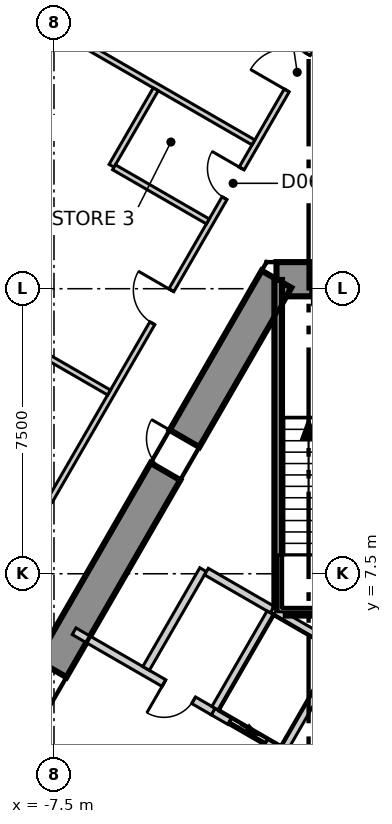
"""IFC4 building model, lengths in metres.
Left out: names, types, materials, properties, quantities, classifications, styles, units other than length and angle.
Written with IfcOpenShell. Run it as: python <this file> out.ifc"""

import sys

from ifc_helpers import new_model, si_unit, direction, frame, frame_2d, origin, place, context, subcontext, project, spatial, polyline, rectangle, outline, extrude, element, fill, save


model = new_model("IFC4")
c1 = context("Model", 3, precision=1e-05, world=origin(), true_north=direction((0.0, 1.0)))
c2 = subcontext(c1, "Body", "Model", "MODEL_VIEW")
j1 = project(units=[si_unit("LENGTHUNIT", "METRE"), si_unit("PLANEANGLEUNIT", "RADIAN")], contexts=[c1])
p1 = place(None, origin())
s1 = spatial("IfcSite", under=j1, at=p1, CompositionType="ELEMENT")
p2 = place(p1, origin())
s2 = spatial("IfcBuilding", under=s1, at=p2, CompositionType="ELEMENT")
p3 = place(p2, frame((0.0, 0.0, 35.3)))
s3 = spatial("IfcBuildingStorey", under=s2, at=p3, CompositionType="ELEMENT", Elevation=35.3)
p4 = place(p3, frame((1.645, 15.25, -0.3), z_axis=(0.0, 0.0, 1.0), x_axis=(-1.0, 0.0, 0.0)))
e1 = element("IfcWall", 1, at=p4, inside=s3, PredefinedType="SHEAR", context=c2, shape_type="SweptSolid", body=[
    extrude(outline(polyline([(-0.26, -0.45), (1.645, -0.45), (3.55, -0.45), (3.031, 0.45), (1.645, 0.45), (0.259, 0.45), (-0.26, -0.45)])), origin(), (0.0, 0.0, 1.0), 4.0),
])
p5 = place(p4, frame((0.945, 0.0, 0.3)))
e2 = element("IfcOpeningElement", 2, at=p5, cuts=e1, PredefinedType="OPENING", context=c2, shape_type="SweptSolid", body=[
    extrude(rectangle(XDim=1.4, YDim=2.1, at=frame_2d((0.7, 1.05))), frame((0.0, 0.46, 0.0), z_axis=(0.0, -1.0, 0.0), x_axis=(1.0, 0.0, 0.0)), (0.0, 0.0, 1.0), 0.92),
])
p6 = place(p3, frame((-1.645, 15.25, -0.3), z_axis=(0.0, 0.0, 1.0), x_axis=(-0.500026485275, -0.866010111964, 0.0)))
e3 = element("IfcWall", 3, at=p6, inside=s3, PredefinedType="SHEAR", context=c2, shape_type="SweptSolid", body=[
    extrude(outline(polyline([(-0.26, -0.45), (1.685, -0.45), (3.63, -0.45), (5.576, -0.45), (7.521, -0.45), (9.466, -0.449), (11.411, -0.449), (13.357, -0.449), (15.302, -0.449), (17.247, -0.449), (19.192, -0.449), (21.138, -0.449), (23.083, -0.449), (25.028, -0.449), (24.509, 0.45), (22.644, 0.45), (20.778, 0.45), (18.913, 0.45), (17.048, 0.45), (15.182, 0.449), (13.317, 0.449), (11.452, 0.449), (9.587, 0.449), (7.721, 0.449), (5.856, 0.449), (3.991, 0.449), (2.125, 0.449), (0.26, 0.449), (-0.26, -0.45)])), origin(), (0.0, 0.0, 1.0), 4.0),
])
p7 = place(p6, frame((11.834, 0.0, 0.3)))
e4 = element("IfcOpeningElement", 4, at=p7, cuts=e3, PredefinedType="OPENING", context=c2, shape_type="SweptSolid", body=[
    extrude(rectangle(XDim=1.1, YDim=2.1, at=frame_2d((0.55, 1.05))), frame((0.0, 0.46, 0.0), z_axis=(0.0, -1.0, 0.0), x_axis=(1.0, 0.0, 0.0)), (0.0, 0.0, 1.0), 0.92),
])
p8 = place(p6, frame((4.842, 0.0, 0.3)))
e5 = element("IfcOpeningElement", 5, at=p8, cuts=e3, PredefinedType="OPENING", context=c2, shape_type="SweptSolid", body=[
    extrude(rectangle(XDim=1.0, YDim=2.1, at=frame_2d((0.5, 1.05))), frame((0.0, 0.46, 0.0), z_axis=(0.0, -1.0, 0.0), x_axis=(1.0, 0.0, 0.0)), (0.0, 0.0, 1.0), 0.92),
])
p9 = place(p3, frame((-3.462, 38.603, 0.0), z_axis=(0.0, 0.0, 1.0), x_axis=(-0.500012207976, -0.866018355391, 0.0)))
e6 = element("IfcWall", 6, at=p9, inside=s3, PredefinedType="ELEMENTEDWALL", context=c2, shape_type="SweptSolid", body=[
    extrude(rectangle(XDim=63.381, YDim=0.2, at=frame_2d((31.69, 0.0))), origin(), (0.0, 0.0, 1.0), 3.7),
])
p10 = place(p9, frame((2.302, 0.0, 0.9)))
e7 = element("IfcOpeningElement", 7, at=p10, cuts=e6, PredefinedType="OPENING", context=c2, shape_type="SweptSolid", body=[
    extrude(rectangle(XDim=5.6, YDim=2.5, at=frame_2d((2.8, 1.25))), frame((0.0, 0.11, 0.0), z_axis=(0.0, -1.0, 0.0), x_axis=(1.0, 0.0, 0.0)), (0.0, 0.0, 1.0), 0.22),
])
p11 = place(p9, frame((9.902, 0.0, 0.9)))
e8 = element("IfcOpeningElement", 8, at=p11, cuts=e6, PredefinedType="OPENING", context=c2, shape_type="SweptSolid", body=[
    extrude(rectangle(XDim=5.6, YDim=2.5, at=frame_2d((2.8, 1.25))), frame((0.0, 0.11, 0.0), z_axis=(0.0, -1.0, 0.0), x_axis=(1.0, 0.0, 0.0)), (0.0, 0.0, 1.0), 0.22),
])
p12 = place(p9, frame((17.501, 0.0, 0.9)))
e9 = element("IfcOpeningElement", 9, at=p12, cuts=e6, PredefinedType="OPENING", context=c2, shape_type="SweptSolid", body=[
    extrude(rectangle(XDim=5.6, YDim=2.5, at=frame_2d((2.8, 1.25))), frame((0.0, 0.11, 0.0), z_axis=(0.0, -1.0, 0.0), x_axis=(1.0, 0.0, 0.0)), (0.0, 0.0, 1.0), 0.22),
])
p13 = place(p9, frame((25.1, 0.0, 0.9)))
e10 = element("IfcOpeningElement", 10, at=p13, cuts=e6, PredefinedType="OPENING", context=c2, shape_type="SweptSolid", body=[
    extrude(rectangle(XDim=5.6, YDim=2.5, at=frame_2d((2.8, 1.25))), frame((0.0, 0.11, 0.0), z_axis=(0.0, -1.0, 0.0), x_axis=(1.0, 0.0, 0.0)), (0.0, 0.0, 1.0), 0.22),
])
p14 = place(p9, frame((32.7, 0.0, 0.9)))
e11 = element("IfcOpeningElement", 11, at=p14, cuts=e6, PredefinedType="OPENING", context=c2, shape_type="SweptSolid", body=[
    extrude(rectangle(XDim=5.6, YDim=2.5, at=frame_2d((2.8, 1.25))), frame((0.0, 0.11, 0.0), z_axis=(0.0, -1.0, 0.0), x_axis=(1.0, 0.0, 0.0)), (0.0, 0.0, 1.0), 0.22),
])
p15 = place(p9, frame((40.299, 0.0, 0.9)))
e12 = element("IfcOpeningElement", 12, at=p15, cuts=e6, PredefinedType="OPENING", context=c2, shape_type="SweptSolid", body=[
    extrude(rectangle(XDim=5.6, YDim=2.5, at=frame_2d((2.8, 1.25))), frame((0.0, 0.11, 0.0), z_axis=(0.0, -1.0, 0.0), x_axis=(1.0, 0.0, 0.0)), (0.0, 0.0, 1.0), 0.22),
])
p16 = place(p9, frame((47.899, 0.0, 0.9)))
e13 = element("IfcOpeningElement", 13, at=p16, cuts=e6, PredefinedType="OPENING", context=c2, shape_type="SweptSolid", body=[
    extrude(rectangle(XDim=5.6, YDim=2.5, at=frame_2d((2.8, 1.25))), frame((0.0, 0.11, 0.0), z_axis=(0.0, -1.0, 0.0), x_axis=(1.0, 0.0, 0.0)), (0.0, 0.0, 1.0), 0.22),
])
p17 = place(p9, frame((55.498, 0.0, 0.9)))
e14 = element("IfcOpeningElement", 14, at=p17, cuts=e6, PredefinedType="OPENING", context=c2, shape_type="SweptSolid", body=[
    extrude(rectangle(XDim=5.6, YDim=2.5, at=frame_2d((2.8, 1.25))), frame((0.0, 0.11, 0.0), z_axis=(0.0, -1.0, 0.0), x_axis=(1.0, 0.0, 0.0)), (0.0, 0.0, 1.0), 0.22),
])
p18 = place(p3, frame((-19.497, -11.17, 0.0), z_axis=(0.0, 0.0, 1.0), x_axis=(0.499998854553, 0.866026065108, 0.0)))
e15 = element("IfcWall", 15, at=p18, inside=s3, PredefinedType="PARTITIONING", context=c2, shape_type="SweptSolid", body=[
    extrude(rectangle(XDim=38.994, YDim=0.15, at=frame_2d((19.497, 0.0))), origin(), (0.0, 0.0, 1.0), 3.7),
])
p19 = place(p18, frame((36.244, 0.0, 0.0)))
e16 = element("IfcOpeningElement", 16, at=p19, cuts=e15, PredefinedType="OPENING", context=c2, shape_type="SweptSolid", body=[
    extrude(rectangle(XDim=1.1, YDim=2.1, at=frame_2d((0.55, 1.05))), frame((0.0, 0.085, 0.0), z_axis=(0.0, -1.0, 0.0), x_axis=(1.0, 0.0, 0.0)), (0.0, 0.0, 1.0), 0.17),
])
p20 = place(p18, frame((29.171, 0.0, 0.0)))
e17 = element("IfcOpeningElement", 17, at=p20, cuts=e15, PredefinedType="OPENING", context=c2, shape_type="SweptSolid", body=[
    extrude(rectangle(XDim=1.0, YDim=2.1, at=frame_2d((0.5, 1.05))), frame((0.0, 0.085, 0.0), z_axis=(0.0, -1.0, 0.0), x_axis=(1.0, 0.0, 0.0)), (0.0, 0.0, 1.0), 0.17),
])
p21 = place(p18, frame((32.971, 0.0, 0.0)))
e18 = element("IfcOpeningElement", 18, at=p21, cuts=e15, PredefinedType="OPENING", context=c2, shape_type="SweptSolid", body=[
    extrude(rectangle(XDim=0.9, YDim=2.1, at=frame_2d((0.45, 1.05))), frame((0.0, 0.085, 0.0), z_axis=(0.0, -1.0, 0.0), x_axis=(1.0, 0.0, 0.0)), (0.0, 0.0, 1.0), 0.17),
])
p22 = place(p18, frame((22.771, 0.0, 0.0)))
e19 = element("IfcOpeningElement", 19, at=p22, cuts=e15, PredefinedType="OPENING", context=c2, shape_type="SweptSolid", body=[
    extrude(rectangle(XDim=1.0, YDim=2.1, at=frame_2d((0.5, 1.05))), frame((0.0, 0.085, 0.0), z_axis=(0.0, -1.0, 0.0), x_axis=(1.0, 0.0, 0.0)), (0.0, 0.0, 1.0), 0.17),
])
p23 = place(p18, frame((6.872, 0.0, 0.0)))
e20 = element("IfcOpeningElement", 20, at=p23, cuts=e15, PredefinedType="OPENING", context=c2, shape_type="SweptSolid", body=[
    extrude(rectangle(XDim=1.1, YDim=2.1, at=frame_2d((0.55, 1.05))), frame((0.0, 0.085, 0.0), z_axis=(0.0, -1.0, 0.0), x_axis=(1.0, 0.0, 0.0)), (0.0, 0.0, 1.0), 0.17),
])
p24 = place(p18, frame((17.372, 0.0, 0.0)))
e21 = element("IfcOpeningElement", 21, at=p24, cuts=e15, PredefinedType="OPENING", context=c2, shape_type="SweptSolid", body=[
    extrude(rectangle(XDim=0.9, YDim=2.1, at=frame_2d((0.45, 1.05))), frame((0.0, 0.085, 0.0), z_axis=(0.0, -1.0, 0.0), x_axis=(1.0, 0.0, 0.0)), (0.0, 0.0, 1.0), 0.17),
])
p25 = place(p18, frame((14.172, 0.0, 0.0)))
e22 = element("IfcOpeningElement", 22, at=p25, cuts=e15, PredefinedType="OPENING", context=c2, shape_type="SweptSolid", body=[
    extrude(rectangle(XDim=0.9, YDim=2.1, at=frame_2d((0.45, 1.05))), frame((0.0, 0.085, 0.0), z_axis=(0.0, -1.0, 0.0), x_axis=(1.0, 0.0, 0.0)), (0.0, 0.0, 1.0), 0.17),
])
p26 = place(p18, frame((11.272, 0.0, 0.0)))
e23 = element("IfcOpeningElement", 23, at=p26, cuts=e15, PredefinedType="OPENING", context=c2, shape_type="SweptSolid", body=[
    extrude(rectangle(XDim=1.0, YDim=2.1, at=frame_2d((0.5, 1.05))), frame((0.0, 0.085, 0.0), z_axis=(0.0, -1.0, 0.0), x_axis=(1.0, 0.0, 0.0)), (0.0, 0.0, 1.0), 0.17),
])
p27 = place(p18, frame((1.473, 0.0, 0.0)))
e24 = element("IfcOpeningElement", 24, at=p27, cuts=e15, PredefinedType="OPENING", context=c2, shape_type="SweptSolid", body=[
    extrude(rectangle(XDim=1.1, YDim=2.1, at=frame_2d((0.55, 1.05))), frame((0.0, 0.085, 0.0), z_axis=(0.0, -1.0, 0.0), x_axis=(1.0, 0.0, 0.0)), (0.0, 0.0, 1.0), 0.17),
])
p28 = place(p3, frame((-15.443, 17.691, 0.0), z_axis=(0.0, 0.0, 1.0), x_axis=(0.866051380023, -0.499955005135, 0.0)))
e25 = element("IfcWall", 25, at=p28, inside=s3, PredefinedType="PARTITIONING", context=c2, shape_type="SweptSolid", body=[
    extrude(rectangle(XDim=10.845, YDim=0.15, at=frame_2d((5.422, 0.0))), origin(), (0.0, 0.0, 1.0), 3.7),
])
p29 = place(p3, frame((-11.643, 24.272, 0.0), z_axis=(0.0, 0.0, 1.0), x_axis=(0.866028869058, -0.499993997921, 0.0)))
e26 = element("IfcWall", 26, at=p29, inside=s3, PredefinedType="PARTITIONING", context=c2, shape_type="SweptSolid", body=[
    extrude(rectangle(XDim=10.844, YDim=0.15, at=frame_2d((5.422, 0.0))), origin(), (0.0, 0.0, 1.0), 3.7),
])
p30 = place(p3, frame((-5.985, 18.234, 0.0), z_axis=(0.0, 0.0, 1.0), x_axis=(0.500067724834, 0.865986299303, 0.0)))
e27 = element("IfcWall", 27, at=p30, inside=s3, PredefinedType="PARTITIONING", context=c2, shape_type="SweptSolid", body=[
    extrude(rectangle(XDim=2.326, YDim=0.15, at=frame_2d((1.163, 0.0))), origin(), (0.0, 0.0, 1.0), 3.7),
])
p31 = place(p3, frame((-5.92, 18.196, 0.0), z_axis=(0.0, 0.0, 1.0), x_axis=(0.866004402611, -0.500036373335, 0.0)))
e28 = element("IfcWall", 28, at=p31, inside=s3, PredefinedType="PARTITIONING", context=c2, shape_type="SweptSolid", body=[
    extrude(rectangle(XDim=2.85, YDim=0.15, at=frame_2d((1.425, 0.0))), origin(), (0.0, 0.0, 1.0), 3.7),
])
p32 = place(p3, frame((-8.67, 3.043, 0.0), z_axis=(0.0, 0.0, 1.0), x_axis=(0.866029956157, -0.499992114976, 0.0)))
e29 = element("IfcWall", 29, at=p32, inside=s3, PredefinedType="SOLIDWALL", context=c2, shape_type="SweptSolid", body=[
    extrude(rectangle(XDim=4.232, YDim=0.2, at=frame_2d((2.116, 0.0))), origin(), (0.0, 0.0, 1.0), 3.7),
])
p33 = place(p32, frame((2.63, 0.0, 0.0)))
e30 = element("IfcOpeningElement", 30, at=p33, cuts=e29, PredefinedType="OPENING", context=c2, shape_type="SweptSolid", body=[
    extrude(rectangle(XDim=1.1, YDim=2.1, at=frame_2d((0.55, 1.05))), frame((0.0, 0.11, 0.0), z_axis=(0.0, -1.0, 0.0), x_axis=(1.0, 0.0, 0.0)), (0.0, 0.0, 1.0), 0.22),
])
p34 = place(p3, frame((-6.97, 5.987, 0.0), z_axis=(0.0, 0.0, 1.0), x_axis=(0.866029956157, -0.499992114976, 0.0)))
e31 = element("IfcWall", 31, at=p34, inside=s3, PredefinedType="SOLIDWALL", context=c2, shape_type="SweptSolid", body=[
    extrude(rectangle(XDim=4.232, YDim=0.2, at=frame_2d((2.116, 0.0))), origin(), (0.0, 0.0, 1.0), 3.7),
])
p35 = place(p34, frame((2.73, 0.0, 0.0)))
e32 = element("IfcOpeningElement", 32, at=p35, cuts=e31, PredefinedType="OPENING", context=c2, shape_type="SweptSolid", body=[
    extrude(rectangle(XDim=0.9, YDim=2.1, at=frame_2d((0.45, 1.05))), frame((0.0, 0.11, 0.0), z_axis=(0.0, -1.0, 0.0), x_axis=(1.0, 0.0, 0.0)), (0.0, 0.0, 1.0), 0.22),
])
p36 = place(p3, frame((-5.076, 5.009, 0.0), z_axis=(0.0, 0.0, 1.0), x_axis=(0.50002537861, 0.866010750942, 0.0)))
e33 = element("IfcWall", 33, at=p36, inside=s3, PredefinedType="SOLIDWALL", context=c2, shape_type="SweptSolid", body=[
    extrude(rectangle(XDim=3.0, YDim=0.2, at=frame_2d((1.5, 0.0))), origin(), (0.0, 0.0, 1.0), 3.7),
])
p37 = place(p3, frame((-3.489, 7.557, 0.0), z_axis=(0.0, 0.0, 1.0), x_axis=(0.866010750942, -0.50002537861, 0.0)))
e34 = element("IfcWall", 34, at=p37, inside=s3, PredefinedType="SOLIDWALL", context=c2, shape_type="SweptSolid", body=[
    extrude(rectangle(XDim=2.0, YDim=0.2, at=frame_2d((1.0, 0.0))), origin(), (0.0, 0.0, 1.0), 3.7),
])
p38 = place(p3, frame((-3.309, 3.873, 0.0), z_axis=(0.0, 0.0, 1.0), x_axis=(0.866098583652, -0.499873227325, 0.0)))
e35 = element("IfcWall", 35, at=p38, inside=s3, PredefinedType="SOLIDWALL", context=c2, shape_type="SweptSolid", body=[
    extrude(rectangle(XDim=2.103, YDim=0.2, at=frame_2d((1.051, 0.0))), origin(), (0.0, 0.0, 1.0), 3.7),
])
p39 = place(p38, frame((0.502, 0.0, 0.0)))
e36 = element("IfcOpeningElement", 36, at=p39, cuts=e35, PredefinedType="OPENING", context=c2, shape_type="SweptSolid", body=[
    extrude(rectangle(XDim=1.1, YDim=2.1, at=frame_2d((0.55, 1.05))), frame((0.0, 0.11, 0.0), z_axis=(0.0, -1.0, 0.0), x_axis=(1.0, 0.0, 0.0)), (0.0, 0.0, 1.0), 0.22),
])
p40 = place(p3, frame((-3.257, 3.959, 0.0), z_axis=(0.0, 0.0, 1.0), x_axis=(0.50012328804, 0.865954211699, 0.0)))
e37 = element("IfcWall", 37, at=p40, inside=s3, PredefinedType="SOLIDWALL", context=c2, shape_type="SweptSolid", body=[
    extrude(rectangle(XDim=2.9, YDim=0.2, at=frame_2d((1.45, 0.0))), origin(), (0.0, 0.0, 1.0), 3.7),
])
p41 = place(p3, frame((-1.67, 6.507, 0.0), z_axis=(0.0, 0.0, 1.0), x_axis=(0.865941441609, -0.500145398563, 0.0)))
e38 = element("IfcWall", 38, at=p41, inside=s3, PredefinedType="SOLIDWALL", context=c2, shape_type="SweptSolid", body=[
    extrude(rectangle(XDim=1.815, YDim=0.2, at=frame_2d((0.908, 0.0))), origin(), (0.0, 0.0, 1.0), 3.7),
])
p42 = place(p3, frame((-1.438, 2.909, 0.0), z_axis=(0.0, 0.0, 1.0), x_axis=(0.499829630636, 0.866123744241, 0.0)))
e39 = element("IfcWall", 39, at=p42, inside=s3, PredefinedType="SOLIDWALL", context=c2, shape_type="SweptSolid", body=[
    extrude(rectangle(XDim=2.761, YDim=0.2, at=frame_2d((1.38, 0.0))), origin(), (0.0, 0.0, 1.0), 3.7),
])
p43 = place(p3, frame((-1.4, 6.5, 0.0), z_axis=(0.0, 0.0, 1.0), x_axis=(1.0, 0.0, 0.0)))
e40 = element("IfcWall", 40, at=p43, inside=s3, PredefinedType="SOLIDWALL", context=c2, shape_type="SweptSolid", body=[
    extrude(rectangle(XDim=2.8, YDim=0.2, at=frame_2d((1.4, 0.0))), origin(), (0.0, 0.0, 1.0), 3.7),
])
p44 = place(p3, frame((-1.6, 6.615, 0.0), z_axis=(0.0, 0.0, 1.0), x_axis=(0.0, 1.0, 0.0)))
e41 = element("IfcWall", 41, at=p44, inside=s3, PredefinedType="SOLIDWALL", context=c2, shape_type="SweptSolid", body=[
    extrude(rectangle(XDim=8.615, YDim=0.2, at=frame_2d((4.308, 0.0))), origin(), (0.0, 0.0, 1.0), 3.7),
])
p45 = place(p39, origin())
e42 = element("IfcDoor", 42, at=p45, inside=s3, OperationType="SLIDING_TO_LEFT", PredefinedType="DOOR", context=c2, shape_type="SweptSolid", body=[
    extrude(rectangle(XDim=1.1, YDim=2.1, at=frame_2d((0.55, 1.05))), frame((0.0, 0.025, 0.0), z_axis=(0.0, -1.0, 0.0), x_axis=(1.0, 0.0, 0.0)), (0.0, 0.0, 1.0), 0.05),
])
fill(e36, e42)
p46 = place(p35, origin())
e43 = element("IfcDoor", 43, at=p46, inside=s3, OperationType="SINGLE_SWING_LEFT", PredefinedType="DOOR", context=c2, shape_type="SweptSolid", body=[
    extrude(rectangle(XDim=0.9, YDim=2.1, at=frame_2d((0.45, 1.05))), frame((0.0, 0.025, 0.0), z_axis=(0.0, -1.0, 0.0), x_axis=(1.0, 0.0, 0.0)), (0.0, 0.0, 1.0), 0.05),
])
fill(e32, e43)
p47 = place(p19, origin())
e44 = element("IfcDoor", 44, at=p47, inside=s3, OperationType="SINGLE_SWING_RIGHT", PredefinedType="DOOR", context=c2, shape_type="SweptSolid", body=[
    extrude(rectangle(XDim=1.1, YDim=2.1, at=frame_2d((0.55, 1.05))), frame((0.0, 0.025, 0.0), z_axis=(0.0, -1.0, 0.0), x_axis=(1.0, 0.0, 0.0)), (0.0, 0.0, 1.0), 0.05),
])
fill(e16, e44)
p48 = place(p20, origin())
e45 = element("IfcDoor", 45, at=p48, inside=s3, OperationType="SINGLE_SWING_LEFT", PredefinedType="DOOR", context=c2, shape_type="SweptSolid", body=[
    extrude(rectangle(XDim=1.0, YDim=2.1, at=frame_2d((0.5, 1.05))), frame((0.0, 0.025, 0.0), z_axis=(0.0, -1.0, 0.0), x_axis=(1.0, 0.0, 0.0)), (0.0, 0.0, 1.0), 0.05),
])
fill(e17, e45)
p49 = place(p21, origin())
e46 = element("IfcDoor", 46, at=p49, inside=s3, OperationType="SINGLE_SWING_LEFT", PredefinedType="DOOR", context=c2, shape_type="SweptSolid", body=[
    extrude(rectangle(XDim=0.9, YDim=2.1, at=frame_2d((0.45, 1.05))), frame((0.0, 0.025, 0.0), z_axis=(0.0, -1.0, 0.0), x_axis=(1.0, 0.0, 0.0)), (0.0, 0.0, 1.0), 0.05),
])
fill(e18, e46)
p50 = place(p7, origin())
e47 = element("IfcDoor", 47, at=p50, inside=s3, OperationType="SINGLE_SWING_LEFT", PredefinedType="DOOR", context=c2, shape_type="SweptSolid", body=[
    extrude(rectangle(XDim=1.1, YDim=2.1, at=frame_2d((0.55, 1.05))), frame((0.0, 0.025, 0.0), z_axis=(0.0, -1.0, 0.0), x_axis=(1.0, 0.0, 0.0)), (0.0, 0.0, 1.0), 0.05),
])
fill(e4, e47)
p51 = place(p8, origin())
e48 = element("IfcDoor", 48, at=p51, inside=s3, OperationType="SINGLE_SWING_LEFT", PredefinedType="DOOR", context=c2, shape_type="SweptSolid", body=[
    extrude(rectangle(XDim=1.0, YDim=2.1, at=frame_2d((0.5, 1.05))), frame((0.0, 0.025, 0.0), z_axis=(0.0, -1.0, 0.0), x_axis=(1.0, 0.0, 0.0)), (0.0, 0.0, 1.0), 0.05),
])
fill(e5, e48)
save(model, sys.argv[1])
